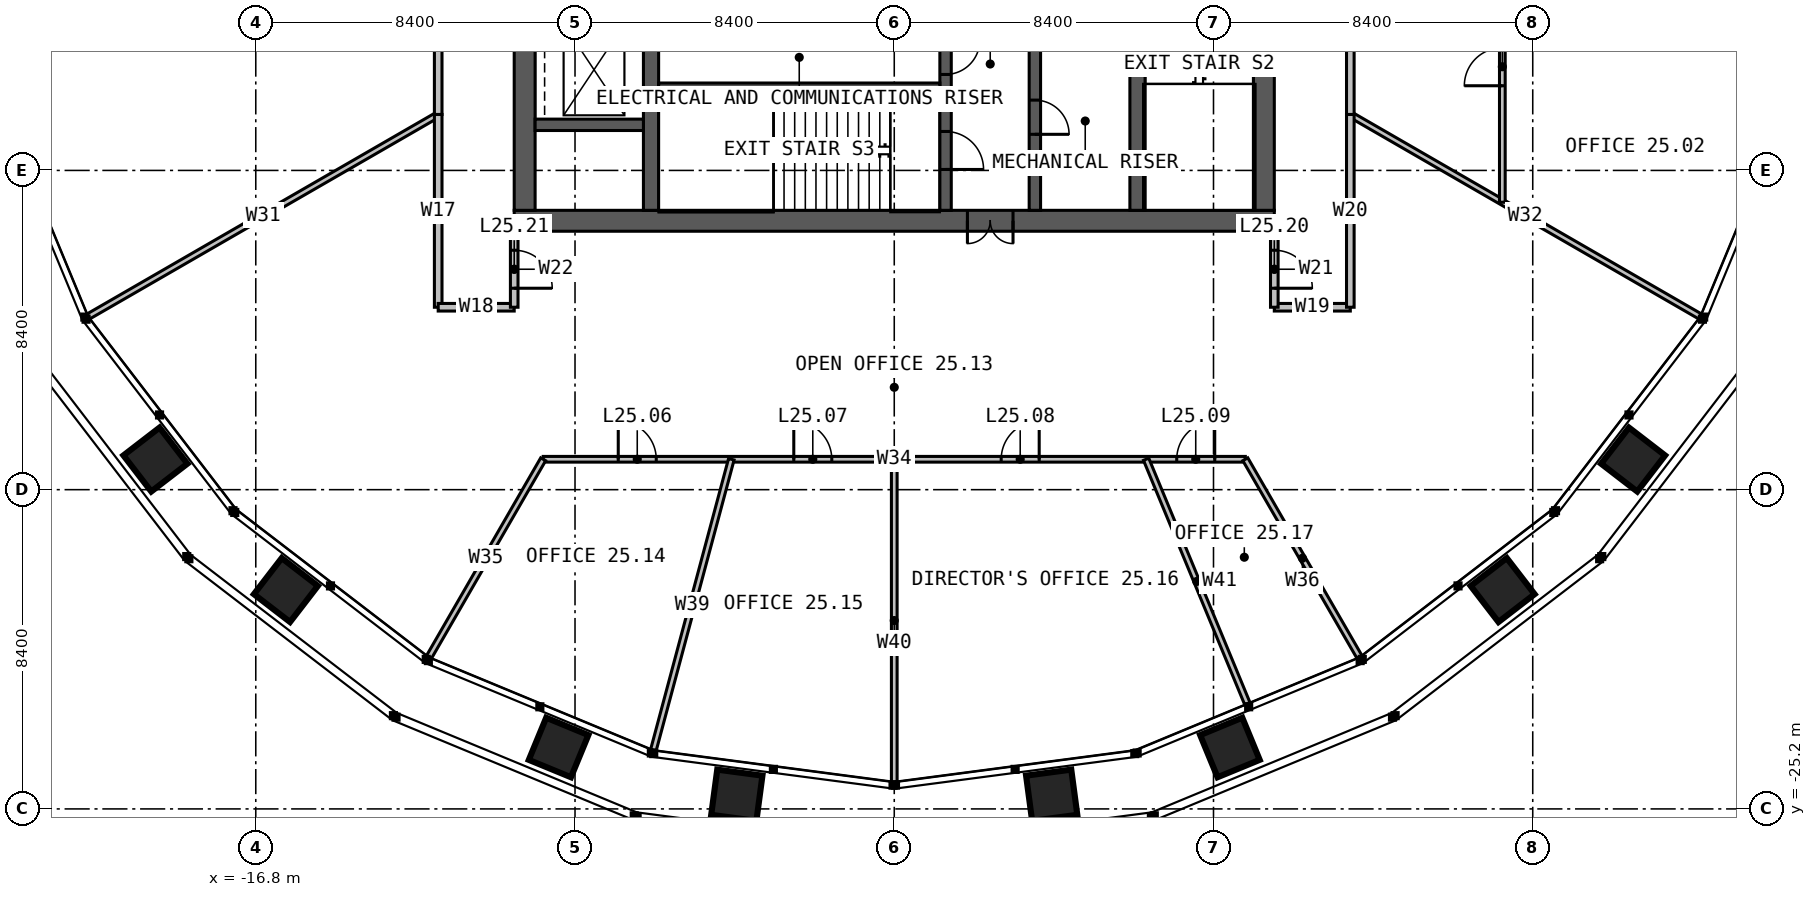
"""IFC4 building model, lengths in metres.
Left out: names, types, materials, properties, quantities, classifications, styles, units other than length and angle.
Written with IfcOpenShell. Run it as: python <this file> out.ifc"""

import sys

from ifc_helpers import new_model, si_unit, direction, frame, frame_2d, origin, place, context, subcontext, project, spatial, rectangle, extrude, element, fill, save


model = new_model("IFC4")
c1 = context("Model", 3, precision=1e-05, world=origin(), true_north=direction((0.0, 1.0)))
c2 = subcontext(c1, "Body", "Model", "MODEL_VIEW")
j1 = project(units=[si_unit("LENGTHUNIT", "METRE"), si_unit("PLANEANGLEUNIT", "RADIAN")], contexts=[c1])
p1 = place(None, origin())
s1 = spatial("IfcSite", under=j1, at=p1, CompositionType="ELEMENT")
p2 = place(p1, origin())
s2 = spatial("IfcBuilding", under=s1, at=p2, CompositionType="ELEMENT")
p3 = place(p2, frame((0.0, 0.0, 106.0)))
s3 = spatial("IfcBuildingStorey", under=s2, at=p3, CompositionType="ELEMENT", Elevation=106.0)
p4 = place(p3, frame((10.0, -9.725, 0.0), z_axis=(0.0, 0.0, 1.0), x_axis=(-1.0, 0.0, 0.0)))
e1 = element("IfcWall", 1, at=p4, inside=s3, PredefinedType="SOLIDWALL", context=c2, shape_type="SweptSolid", body=[
    extrude(rectangle(XDim=20.0, YDim=0.55, at=frame_2d((10.0, 0.0))), origin(), (0.0, 0.0, 1.0), 4.0),
])
p5 = place(p4, frame((6.875, 0.0, 0.0)))
e2 = element("IfcOpeningElement", 2, at=p5, cuts=e1, PredefinedType="OPENING", context=c2, shape_type="SweptSolid", body=[
    extrude(rectangle(XDim=1.2, YDim=2.2, at=frame_2d((0.6, 1.1))), frame((0.0, 0.285, 0.0), z_axis=(0.0, -1.0, 0.0), x_axis=(1.0, 0.0, 0.0)), (0.0, 0.0, 1.0), 0.57),
])
for number, where, z_axis, x_axis in (
    (3, (9.725, -9.45, 0.0), (0.0, 0.0, 1.0), (0.0, 1.0, 0.0)),
    (4, (-9.725, 9.45, 0.0), (0.0, 0.0, 1.0), (0.0, -1.0, 0.0)),
):
    element("IfcWall", number, at=place(p3, frame(where, z_axis=z_axis, x_axis=x_axis)), inside=s3, PredefinedType="SOLIDWALL", context=c2, shape_type="SweptSolid", body=[
        extrude(rectangle(XDim=18.9, YDim=0.55, at=frame_2d((9.45, 0.0))), origin(), (0.0, 0.0, 1.0), 4.0),
    ])
p6 = place(p3, frame((-6.4, -9.45, 0.0), z_axis=(0.0, 0.0, 1.0), x_axis=(0.0, 1.0, 0.0)))
e5 = element("IfcWall", 5, at=p6, inside=s3, PredefinedType="SOLIDWALL", context=c2, shape_type="SweptSolid", body=[
    extrude(rectangle(XDim=18.9, YDim=0.4, at=frame_2d((9.45, 0.0))), origin(), (0.0, 0.0, 1.0), 4.0),
])
p7 = place(p6, frame((8.95, 0.0, 0.0)))
e6 = element("IfcOpeningElement", 6, at=p7, cuts=e5, PredefinedType="OPENING", context=c2, shape_type="SweptSolid", body=[
    extrude(rectangle(XDim=1.0, YDim=2.2, at=frame_2d((0.5, 1.1))), frame((0.0, 0.21, 0.0), z_axis=(0.0, -1.0, 0.0), x_axis=(1.0, 0.0, 0.0)), (0.0, 0.0, 1.0), 0.42),
])
p8 = place(p3, frame((6.4, 9.45, 0.0), z_axis=(0.0, 0.0, 1.0), x_axis=(0.0, -1.0, 0.0)))
e7 = element("IfcWall", 7, at=p8, inside=s3, PredefinedType="SOLIDWALL", context=c2, shape_type="SweptSolid", body=[
    extrude(rectangle(XDim=18.9, YDim=0.4, at=frame_2d((9.45, 0.0))), origin(), (0.0, 0.0, 1.0), 4.0),
])
p9 = place(p8, frame((8.95, 0.0, 0.0)))
e8 = element("IfcOpeningElement", 8, at=p9, cuts=e7, PredefinedType="OPENING", context=c2, shape_type="SweptSolid", body=[
    extrude(rectangle(XDim=1.0, YDim=2.2, at=frame_2d((0.5, 1.1))), frame((0.0, 0.21, 0.0), z_axis=(0.0, -1.0, 0.0), x_axis=(1.0, 0.0, 0.0)), (0.0, 0.0, 1.0), 0.42),
])
p10 = place(p3, frame((1.35, -1.45, 0.0), z_axis=(0.0, 0.0, 1.0), x_axis=(0.0, -1.0, 0.0)))
e9 = element("IfcWall", 9, at=p10, inside=s3, PredefinedType="SOLIDWALL", context=c2, shape_type="SweptSolid", body=[
    extrude(rectangle(XDim=8.0, YDim=0.3, at=frame_2d((4.0, 0.0))), origin(), (0.0, 0.0, 1.0), 4.0),
])
p11 = place(p10, frame((5.925, 0.0, 0.0)))
e10 = element("IfcOpeningElement", 10, at=p11, cuts=e9, PredefinedType="OPENING", context=c2, shape_type="SweptSolid", body=[
    extrude(rectangle(XDim=1.0, YDim=2.2, at=frame_2d((0.5, 1.1))), frame((0.0, 0.16, 0.0), z_axis=(0.0, -1.0, 0.0), x_axis=(1.0, 0.0, 0.0)), (0.0, 0.0, 1.0), 0.32),
])
p12 = place(p10, frame((3.525, 0.0, 0.0)))
e11 = element("IfcOpeningElement", 11, at=p12, cuts=e9, PredefinedType="OPENING", context=c2, shape_type="SweptSolid", body=[
    extrude(rectangle(XDim=0.9, YDim=2.2, at=frame_2d((0.45, 1.1))), frame((0.0, 0.16, 0.0), z_axis=(0.0, -1.0, 0.0), x_axis=(1.0, 0.0, 0.0)), (0.0, 0.0, 1.0), 0.32),
])
p13 = place(p3, frame((3.7, -1.45, 0.0), z_axis=(0.0, 0.0, 1.0), x_axis=(0.0, -1.0, 0.0)))
e12 = element("IfcWall", 12, at=p13, inside=s3, PredefinedType="SOLIDWALL", context=c2, shape_type="SweptSolid", body=[
    extrude(rectangle(XDim=8.0, YDim=0.3, at=frame_2d((4.0, 0.0))), origin(), (0.0, 0.0, 1.0), 4.0),
])
p14 = place(p13, frame((5.1, 0.0, 0.0)))
e13 = element("IfcOpeningElement", 13, at=p14, cuts=e12, PredefinedType="OPENING", context=c2, shape_type="SweptSolid", body=[
    extrude(rectangle(XDim=0.9, YDim=2.2, at=frame_2d((0.45, 1.1))), frame((0.0, 0.16, 0.0), z_axis=(0.0, -1.0, 0.0), x_axis=(1.0, 0.0, 0.0)), (0.0, 0.0, 1.0), 0.32),
])
p15 = place(p3, frame((-6.2, -6.2, 0.0), z_axis=(0.0, 0.0, 1.0), x_axis=(1.0, 0.0, 0.0)))
e14 = element("IfcWall", 14, at=p15, inside=s3, PredefinedType="SOLIDWALL", context=c2, shape_type="SweptSolid", body=[
    extrude(rectangle(XDim=7.4, YDim=0.2, at=frame_2d((3.7, 0.0))), origin(), (0.0, 0.0, 1.0), 4.0),
])
p16 = place(p3, frame((-9.45, -7.2, 0.0), z_axis=(0.0, 0.0, 1.0), x_axis=(1.0, 0.0, 0.0)))
e15 = element("IfcWall", 15, at=p16, inside=s3, PredefinedType="SOLIDWALL", context=c2, shape_type="SweptSolid", body=[
    extrude(rectangle(XDim=2.85, YDim=0.3, at=frame_2d((1.425, 0.0))), origin(), (0.0, 0.0, 1.0), 4.0),
])
for number, where, z_axis, x_axis in (
    (16, (12.0, -6.928, 0.0), (0.0, 0.0, 1.0), (0.866, -0.5, 0.0)),
    (17, (-12.0, -6.928, 0.0), (0.0, 0.0, 1.0), (-0.866, -0.5, 0.0)),
):
    element("IfcWall", number, at=place(p3, frame(where, z_axis=z_axis, x_axis=x_axis)), inside=s3, PredefinedType="PARTITIONING", context=c2, shape_type="SweptSolid", body=[
        extrude(rectangle(XDim=10.631, YDim=0.15, at=frame_2d((5.315, 0.0))), origin(), (0.0, 0.0, 1.0), 2.79),
    ])
p17 = place(p3, frame((16.0, -9.238, 0.0), z_axis=(0.0, 0.0, 1.0), x_axis=(0.0, 1.0, 0.0)))
e18 = element("IfcWall", 18, at=p17, inside=s3, PredefinedType="PARTITIONING", context=c2, shape_type="SweptSolid", body=[
    extrude(rectangle(XDim=18.475, YDim=0.15, at=frame_2d((9.238, 0.0))), origin(), (0.0, 0.0, 1.0), 2.79),
])
p18 = place(p17, frame((3.066, 0.0, 0.0)))
e19 = element("IfcOpeningElement", 19, at=p18, cuts=e18, PredefinedType="OPENING", context=c2, shape_type="SweptSolid", body=[
    extrude(rectangle(XDim=1.0, YDim=2.2, at=frame_2d((0.5, 1.1))), frame((0.0, 0.085, 0.0), z_axis=(0.0, -1.0, 0.0), x_axis=(1.0, 0.0, 0.0)), (0.0, 0.0, 1.0), 0.17),
])
p19 = place(p17, frame((9.828, 0.0, 0.0)))
e20 = element("IfcOpeningElement", 20, at=p19, cuts=e18, PredefinedType="OPENING", context=c2, shape_type="SweptSolid", body=[
    extrude(rectangle(XDim=1.0, YDim=2.2, at=frame_2d((0.5, 1.1))), frame((0.0, 0.085, 0.0), z_axis=(0.0, -1.0, 0.0), x_axis=(1.0, 0.0, 0.0)), (0.0, 0.0, 1.0), 0.17),
])
p20 = place(p17, frame((14.195, 0.0, 0.0)))
e21 = element("IfcOpeningElement", 21, at=p20, cuts=e18, PredefinedType="OPENING", context=c2, shape_type="SweptSolid", body=[
    extrude(rectangle(XDim=1.0, YDim=2.2, at=frame_2d((0.5, 1.1))), frame((0.0, 0.085, 0.0), z_axis=(0.0, -1.0, 0.0), x_axis=(1.0, 0.0, 0.0)), (0.0, 0.0, 1.0), 0.17),
])
p21 = place(p17, frame((16.67, 0.0, 0.0)))
e22 = element("IfcOpeningElement", 22, at=p21, cuts=e18, PredefinedType="OPENING", context=c2, shape_type="SweptSolid", body=[
    extrude(rectangle(XDim=1.0, YDim=2.2, at=frame_2d((0.5, 1.1))), frame((0.0, 0.085, 0.0), z_axis=(0.0, -1.0, 0.0), x_axis=(1.0, 0.0, 0.0)), (0.0, 0.0, 1.0), 0.17),
])
p22 = place(p3, frame((12.0, -6.928, 0.0), z_axis=(0.0, 0.0, 1.0), x_axis=(0.0, 1.0, 0.0)))
e23 = element("IfcWall", 23, at=p22, inside=s3, PredefinedType="PARTITIONING", context=c2, shape_type="SweptSolid", body=[
    extrude(rectangle(XDim=13.856, YDim=0.2, at=frame_2d((6.928, 0.0))), origin(), (0.0, 0.0, 1.0), 3.8),
])
p23 = place(p22, frame((6.028, 0.0, 0.0)))
e24 = element("IfcOpeningElement", 24, at=p23, cuts=e23, PredefinedType="OPENING", context=c2, shape_type="SweptSolid", body=[
    extrude(rectangle(XDim=1.8, YDim=2.2, at=frame_2d((0.9, 1.1))), frame((0.0, 0.11, 0.0), z_axis=(0.0, -1.0, 0.0), x_axis=(1.0, 0.0, 0.0)), (0.0, 0.0, 1.0), 0.22),
])
p24 = place(p3, frame((-12.0, 3.215, 0.0), z_axis=(0.0, 0.0, 1.0), x_axis=(0.0, -1.0, 0.0)))
e25 = element("IfcWall", 25, at=p24, inside=s3, PredefinedType="PARTITIONING", context=c2, shape_type="SweptSolid", body=[
    extrude(rectangle(XDim=10.144, YDim=0.2, at=frame_2d((5.072, 0.0))), origin(), (0.0, 0.0, 1.0), 3.8),
])
p25 = place(p24, frame((4.172, 0.0, 0.0)))
e26 = element("IfcOpeningElement", 26, at=p25, cuts=e25, PredefinedType="OPENING", context=c2, shape_type="SweptSolid", body=[
    extrude(rectangle(XDim=1.8, YDim=2.2, at=frame_2d((0.9, 1.1))), frame((0.0, 0.11, 0.0), z_axis=(0.0, -1.0, 0.0), x_axis=(1.0, 0.0, 0.0)), (0.0, 0.0, 1.0), 0.22),
])
p26 = place(p3, frame((-12.0, -6.928, 0.0), z_axis=(0.0, 0.0, 1.0), x_axis=(0.0, -1.0, 0.0)))
e27 = element("IfcWall", 27, at=p26, inside=s3, PredefinedType="PARTITIONING", context=c2, shape_type="SweptSolid", body=[
    extrude(rectangle(XDim=5.072, YDim=0.2, at=frame_2d((2.536, 0.0))), origin(), (0.0, 0.0, 1.0), 3.8),
])
p27 = place(p3, frame((-12.0, -12.0, 0.0), z_axis=(0.0, 0.0, 1.0), x_axis=(1.0, 0.0, 0.0)))
e28 = element("IfcWall", 28, at=p27, inside=s3, PredefinedType="PARTITIONING", context=c2, shape_type="SweptSolid", body=[
    extrude(rectangle(XDim=2.0, YDim=0.2, at=frame_2d((1.0, 0.0))), origin(), (0.0, 0.0, 1.0), 3.8),
])
p28 = place(p3, frame((-9.238, -16.0, 0.0), z_axis=(0.0, 0.0, 1.0), x_axis=(1.0, 0.0, 0.0)))
e29 = element("IfcWall", 29, at=p28, inside=s3, PredefinedType="PARTITIONING", context=c2, shape_type="SweptSolid", body=[
    extrude(rectangle(XDim=18.475, YDim=0.15, at=frame_2d((9.238, 0.0))), origin(), (0.0, 0.0, 1.0), 2.79),
])
p29 = place(p28, frame((1.975, 0.0, 0.0)))
e30 = element("IfcOpeningElement", 30, at=p29, cuts=e29, PredefinedType="OPENING", context=c2, shape_type="SweptSolid", body=[
    extrude(rectangle(XDim=1.0, YDim=2.2, at=frame_2d((0.5, 1.1))), frame((0.0, 0.085, 0.0), z_axis=(0.0, -1.0, 0.0), x_axis=(1.0, 0.0, 0.0)), (0.0, 0.0, 1.0), 0.17),
])
p30 = place(p28, frame((6.594, 0.0, 0.0)))
e31 = element("IfcOpeningElement", 31, at=p30, cuts=e29, PredefinedType="OPENING", context=c2, shape_type="SweptSolid", body=[
    extrude(rectangle(XDim=1.0, YDim=2.2, at=frame_2d((0.5, 1.1))), frame((0.0, 0.085, 0.0), z_axis=(0.0, -1.0, 0.0), x_axis=(1.0, 0.0, 0.0)), (0.0, 0.0, 1.0), 0.17),
])
p31 = place(p28, frame((12.051, 0.0, 0.0)))
e32 = element("IfcOpeningElement", 32, at=p31, cuts=e29, PredefinedType="OPENING", context=c2, shape_type="SweptSolid", body=[
    extrude(rectangle(XDim=1.0, YDim=2.2, at=frame_2d((0.5, 1.1))), frame((0.0, 0.085, 0.0), z_axis=(0.0, -1.0, 0.0), x_axis=(1.0, 0.0, 0.0)), (0.0, 0.0, 1.0), 0.17),
])
p32 = place(p28, frame((16.67, 0.0, 0.0)))
e33 = element("IfcOpeningElement", 33, at=p32, cuts=e29, PredefinedType="OPENING", context=c2, shape_type="SweptSolid", body=[
    extrude(rectangle(XDim=1.0, YDim=2.2, at=frame_2d((0.5, 1.1))), frame((0.0, 0.085, 0.0), z_axis=(0.0, -1.0, 0.0), x_axis=(1.0, 0.0, 0.0)), (0.0, 0.0, 1.0), 0.17),
])
for number, where, z_axis, x_axis in (
    (34, (-9.238, -16.0, 0.0), (0.0, 0.0, 1.0), (-0.5, -0.866, 0.0)),
    (35, (9.238, -16.0, 0.0), (0.0, 0.0, 1.0), (0.5, -0.866, 0.0)),
):
    element("IfcWall", number, at=place(p3, frame(where, z_axis=z_axis, x_axis=x_axis)), inside=s3, PredefinedType="PARTITIONING", context=c2, shape_type="SweptSolid", body=[
        extrude(rectangle(XDim=6.012, YDim=0.15, at=frame_2d((3.006, 0.0))), origin(), (0.0, 0.0, 1.0), 2.79),
    ])
p33 = place(p3, frame((-4.287, -16.0, 0.0), z_axis=(0.0, 0.0, 1.0), x_axis=(-0.258815152648, -0.965926869261, 0.0)))
e36 = element("IfcWall", 36, at=p33, inside=s3, PredefinedType="PARTITIONING", context=c2, shape_type="SweptSolid", body=[
    extrude(rectangle(XDim=7.923, YDim=0.15, at=frame_2d((3.961, 0.0))), origin(), (0.0, 0.0, 1.0), 2.79),
])
p34 = place(p3, frame((0.0, -16.0, 0.0), z_axis=(0.0, 0.0, 1.0), x_axis=(0.0, -1.0, 0.0)))
e37 = element("IfcWall", 37, at=p34, inside=s3, PredefinedType="PARTITIONING", context=c2, shape_type="SweptSolid", body=[
    extrude(rectangle(XDim=8.487, YDim=0.15, at=frame_2d((4.244, 0.0))), origin(), (0.0, 0.0, 1.0), 2.79),
])
p35 = place(p3, frame((6.627, -16.0, 0.0), z_axis=(0.0, 0.0, 1.0), x_axis=(0.382691565496, -0.923876163616, 0.0)))
e38 = element("IfcWall", 38, at=p35, inside=s3, PredefinedType="PARTITIONING", context=c2, shape_type="SweptSolid", body=[
    extrude(rectangle(XDim=6.959, YDim=0.15, at=frame_2d((3.48, 0.0))), origin(), (0.0, 0.0, 1.0), 2.79),
])
p36 = place(p3, frame((10.0, -12.0, 0.0), z_axis=(0.0, 0.0, 1.0), x_axis=(1.0, 0.0, 0.0)))
e39 = element("IfcWall", 39, at=p36, inside=s3, PredefinedType="PARTITIONING", context=c2, shape_type="SweptSolid", body=[
    extrude(rectangle(XDim=2.0, YDim=0.2, at=frame_2d((1.0, 0.0))), origin(), (0.0, 0.0, 1.0), 3.8),
])
p37 = place(p3, frame((12.0, -12.0, 0.0), z_axis=(0.0, 0.0, 1.0), x_axis=(0.0, 1.0, 0.0)))
e40 = element("IfcWall", 40, at=p37, inside=s3, PredefinedType="PARTITIONING", context=c2, shape_type="SweptSolid", body=[
    extrude(rectangle(XDim=5.072, YDim=0.2, at=frame_2d((2.536, 0.0))), origin(), (0.0, 0.0, 1.0), 3.8),
])
p38 = place(p3, frame((10.0, -10.0, 0.0), z_axis=(0.0, 0.0, 1.0), x_axis=(0.0, -1.0, 0.0)))
e41 = element("IfcWall", 41, at=p38, inside=s3, PredefinedType="PARTITIONING", context=c2, shape_type="SweptSolid", body=[
    extrude(rectangle(XDim=2.0, YDim=0.2, at=frame_2d((1.0, 0.0))), origin(), (0.0, 0.0, 1.0), 3.8),
])
p39 = place(p38, frame((0.5, 0.0, 0.0)))
e42 = element("IfcOpeningElement", 42, at=p39, cuts=e41, PredefinedType="OPENING", context=c2, shape_type="SweptSolid", body=[
    extrude(rectangle(XDim=1.0, YDim=2.2, at=frame_2d((0.5, 1.1))), frame((0.0, 0.11, 0.0), z_axis=(0.0, -1.0, 0.0), x_axis=(1.0, 0.0, 0.0)), (0.0, 0.0, 1.0), 0.22),
])
p40 = place(p3, frame((-10.0, -10.0, 0.0), z_axis=(0.0, 0.0, 1.0), x_axis=(0.0, -1.0, 0.0)))
e43 = element("IfcWall", 43, at=p40, inside=s3, PredefinedType="PARTITIONING", context=c2, shape_type="SweptSolid", body=[
    extrude(rectangle(XDim=2.0, YDim=0.2, at=frame_2d((1.0, 0.0))), origin(), (0.0, 0.0, 1.0), 3.8),
])
p41 = place(p40, frame((0.5, 0.0, 0.0)))
e44 = element("IfcOpeningElement", 44, at=p41, cuts=e43, PredefinedType="OPENING", context=c2, shape_type="SweptSolid", body=[
    extrude(rectangle(XDim=1.0, YDim=2.2, at=frame_2d((0.5, 1.1))), frame((0.0, 0.11, 0.0), z_axis=(0.0, -1.0, 0.0), x_axis=(1.0, 0.0, 0.0)), (0.0, 0.0, 1.0), 0.22),
])
p42 = place(p5, origin())
e45 = element("IfcDoor", 45, at=p42, inside=s3, OperationType="DOUBLE_DOOR_SINGLE_SWING", PredefinedType="DOOR", context=c2, shape_type="SweptSolid", body=[
    extrude(rectangle(XDim=1.2, YDim=2.2, at=frame_2d((0.6, 1.1))), frame((0.0, 0.025, 0.0), z_axis=(0.0, -1.0, 0.0), x_axis=(1.0, 0.0, 0.0)), (0.0, 0.0, 1.0), 0.05),
])
fill(e2, e45)
p43 = place(p11, origin())
e46 = element("IfcDoor", 46, at=p43, inside=s3, OperationType="SINGLE_SWING_RIGHT", PredefinedType="DOOR", context=c2, shape_type="SweptSolid", body=[
    extrude(rectangle(XDim=1.0, YDim=2.2, at=frame_2d((0.5, 1.1))), frame((0.0, 0.025, 0.0), z_axis=(0.0, -1.0, 0.0), x_axis=(1.0, 0.0, 0.0)), (0.0, 0.0, 1.0), 0.05),
])
fill(e10, e46)
p44 = place(p12, origin())
e47 = element("IfcDoor", 47, at=p44, inside=s3, OperationType="SINGLE_SWING_LEFT", PredefinedType="DOOR", context=c2, shape_type="SweptSolid", body=[
    extrude(rectangle(XDim=0.9, YDim=2.2, at=frame_2d((0.45, 1.1))), frame((0.0, 0.025, 0.0), z_axis=(0.0, -1.0, 0.0), x_axis=(1.0, 0.0, 0.0)), (0.0, 0.0, 1.0), 0.05),
])
fill(e11, e47)
p45 = place(p14, origin())
e48 = element("IfcDoor", 48, at=p45, inside=s3, OperationType="SINGLE_SWING_RIGHT", PredefinedType="DOOR", context=c2, shape_type="SweptSolid", body=[
    extrude(rectangle(XDim=0.9, YDim=2.2, at=frame_2d((0.45, 1.1))), frame((0.0, 0.025, 0.0), z_axis=(0.0, -1.0, 0.0), x_axis=(1.0, 0.0, 0.0)), (0.0, 0.0, 1.0), 0.05),
])
fill(e13, e48)
p46 = place(p18, origin())
e49 = element("IfcDoor", 49, at=p46, inside=s3, OperationType="SINGLE_SWING_LEFT", PredefinedType="DOOR", context=c2, shape_type="SweptSolid", body=[
    extrude(rectangle(XDim=1.0, YDim=2.2, at=frame_2d((0.5, 1.1))), frame((0.0, 0.025, 0.0), z_axis=(0.0, -1.0, 0.0), x_axis=(1.0, 0.0, 0.0)), (0.0, 0.0, 1.0), 0.05),
])
fill(e19, e49)
p47 = place(p29, origin())
e50 = element("IfcDoor", 50, at=p47, inside=s3, OperationType="SINGLE_SWING_LEFT", PredefinedType="DOOR", context=c2, shape_type="SweptSolid", body=[
    extrude(rectangle(XDim=1.0, YDim=2.2, at=frame_2d((0.5, 1.1))), frame((0.0, 0.025, 0.0), z_axis=(0.0, -1.0, 0.0), x_axis=(1.0, 0.0, 0.0)), (0.0, 0.0, 1.0), 0.05),
])
fill(e30, e50)
p48 = place(p30, origin())
e51 = element("IfcDoor", 51, at=p48, inside=s3, OperationType="SINGLE_SWING_LEFT", PredefinedType="DOOR", context=c2, shape_type="SweptSolid", body=[
    extrude(rectangle(XDim=1.0, YDim=2.2, at=frame_2d((0.5, 1.1))), frame((0.0, 0.025, 0.0), z_axis=(0.0, -1.0, 0.0), x_axis=(1.0, 0.0, 0.0)), (0.0, 0.0, 1.0), 0.05),
])
fill(e31, e51)
p49 = place(p31, origin())
e52 = element("IfcDoor", 52, at=p49, inside=s3, OperationType="SINGLE_SWING_RIGHT", PredefinedType="DOOR", context=c2, shape_type="SweptSolid", body=[
    extrude(rectangle(XDim=1.0, YDim=2.2, at=frame_2d((0.5, 1.1))), frame((0.0, 0.025, 0.0), z_axis=(0.0, -1.0, 0.0), x_axis=(1.0, 0.0, 0.0)), (0.0, 0.0, 1.0), 0.05),
])
fill(e32, e52)
p50 = place(p32, origin())
e53 = element("IfcDoor", 53, at=p50, inside=s3, OperationType="SINGLE_SWING_RIGHT", PredefinedType="DOOR", context=c2, shape_type="SweptSolid", body=[
    extrude(rectangle(XDim=1.0, YDim=2.2, at=frame_2d((0.5, 1.1))), frame((0.0, 0.025, 0.0), z_axis=(0.0, -1.0, 0.0), x_axis=(1.0, 0.0, 0.0)), (0.0, 0.0, 1.0), 0.05),
])
fill(e33, e53)
p51 = place(p39, origin())
e54 = element("IfcDoor", 54, at=p51, inside=s3, OperationType="SINGLE_SWING_RIGHT", PredefinedType="DOOR", context=c2, shape_type="SweptSolid", body=[
    extrude(rectangle(XDim=1.0, YDim=2.2, at=frame_2d((0.5, 1.1))), frame((0.0, 0.025, 0.0), z_axis=(0.0, -1.0, 0.0), x_axis=(1.0, 0.0, 0.0)), (0.0, 0.0, 1.0), 0.05),
])
fill(e42, e54)
p52 = place(p41, origin())
e55 = element("IfcDoor", 55, at=p52, inside=s3, OperationType="SINGLE_SWING_RIGHT", PredefinedType="DOOR", context=c2, shape_type="SweptSolid", body=[
    extrude(rectangle(XDim=1.0, YDim=2.2, at=frame_2d((0.5, 1.1))), frame((0.0, 0.025, 0.0), z_axis=(0.0, -1.0, 0.0), x_axis=(1.0, 0.0, 0.0)), (0.0, 0.0, 1.0), 0.05),
])
fill(e44, e55)
save(model, sys.argv[1])
